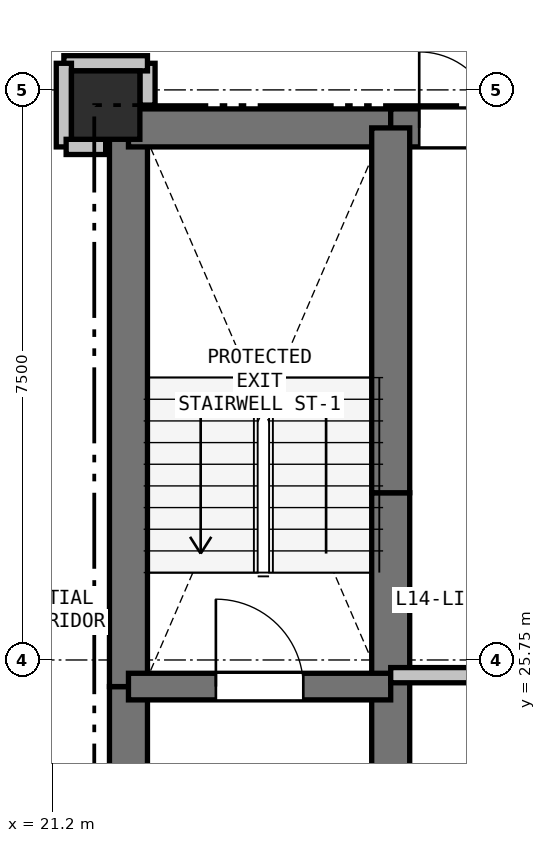
"""IFC4 building model, lengths in metres.
Left out: names, types, materials, properties, quantities, classifications, styles, units other than length and angle.
Written with IfcOpenShell. Run it as: python <this file> out.ifc"""

import sys

from ifc_helpers import new_model, si_unit, direction, frame, frame_2d, origin, origin_2d, place, context, subcontext, project, spatial, rectangle, extrude, element, fill, save


model = new_model("IFC4")
c1 = context("Model", 3, precision=1e-05, world=origin(), true_north=direction((0.0, 1.0)))
c2 = subcontext(c1, "Body", "Model", "MODEL_VIEW")
j1 = project(units=[si_unit("LENGTHUNIT", "METRE"), si_unit("PLANEANGLEUNIT", "RADIAN")], contexts=[c1])
p1 = place(None, origin())
s1 = spatial("IfcSite", under=j1, at=p1, CompositionType="ELEMENT")
p2 = place(p1, origin())
s2 = spatial("IfcBuilding", under=s1, at=p2, CompositionType="ELEMENT")
p3 = place(p2, frame((0.0, 0.0, 52.2)))
s3 = spatial("IfcBuildingStorey", under=s2, at=p3, CompositionType="ELEMENT", Elevation=52.2)
p4 = place(p3, frame((21.9, 33.05, 0.0), z_axis=(0.0, 0.0, 1.0), x_axis=(1.0, 0.0, 0.0)))
e1 = element("IfcColumn", 1, at=p4, inside=s3, PredefinedType="COLUMN", context=c2, shape_type="SweptSolid", body=[
    extrude(rectangle(XDim=0.9, YDim=0.9, at=origin_2d()), origin(), (0.0, 0.0, 1.0), 3.3),
])
p5 = place(p3, frame((22.2, 20.75, 0.0), z_axis=(0.0, 0.0, 1.0), x_axis=(0.0, 1.0, 0.0)))
e2 = element("IfcWall", 2, at=p5, inside=s3, PredefinedType="SHEAR", context=c2, shape_type="SweptSolid", body=[
    extrude(rectangle(XDim=4.65, YDim=0.5, at=frame_2d((2.325, 0.0))), origin(), (0.0, 0.0, 1.0), 3.04),
])
p6 = place(p3, frame((22.2, 25.4, 0.0), z_axis=(0.0, 0.0, 1.0), x_axis=(0.0, 1.0, 0.0)))
e3 = element("IfcWall", 3, at=p6, inside=s3, PredefinedType="SHEAR", context=c2, shape_type="SweptSolid", body=[
    extrude(rectangle(XDim=7.35, YDim=0.5, at=frame_2d((3.675, 0.0))), origin(), (0.0, 0.0, 1.0), 3.04),
])
p7 = place(p3, frame((22.2, 32.75, 0.0), z_axis=(0.0, 0.0, 1.0), x_axis=(1.0, 0.0, 0.0)))
e4 = element("IfcWall", 4, at=p7, inside=s3, PredefinedType="SHEAR", context=c2, shape_type="SweptSolid", body=[
    extrude(rectangle(XDim=3.45, YDim=0.5, at=frame_2d((1.725, 0.0))), origin(), (0.0, 0.0, 1.0), 3.04),
])
p8 = place(p3, frame((25.65, 32.75, 0.0), z_axis=(0.0, 0.0, 1.0), x_axis=(1.0, 0.0, 0.0)))
e5 = element("IfcWall", 5, at=p8, inside=s3, PredefinedType="SHEAR", context=c2, shape_type="SweptSolid", body=[
    extrude(rectangle(XDim=1.75, YDim=0.5, at=frame_2d((0.875, 0.0))), origin(), (0.0, 0.0, 1.0), 3.04),
])
p9 = place(p8, frame((0.375, 0.0, 0.0)))
e6 = element("IfcOpeningElement", 6, at=p9, cuts=e5, PredefinedType="OPENING", context=c2, shape_type="SweptSolid", body=[
    extrude(rectangle(XDim=1.0, YDim=2.15, at=frame_2d((0.5, 1.075))), frame((0.0, 0.26, 0.0), z_axis=(0.0, -1.0, 0.0), x_axis=(1.0, 0.0, 0.0)), (0.0, 0.0, 1.0), 0.52),
])
p10 = place(p3, frame((25.65, 22.75, 0.0), z_axis=(0.0, 0.0, 1.0), x_axis=(0.0, 1.0, 0.0)))
e7 = element("IfcWall", 7, at=p10, inside=s3, PredefinedType="SHEAR", context=c2, shape_type="SweptSolid", body=[
    extrude(rectangle(XDim=2.8, YDim=0.5, at=frame_2d((1.4, 0.0))), origin(), (0.0, 0.0, 1.0), 3.04),
])
p11 = place(p3, frame((25.65, 25.55, 0.0), z_axis=(0.0, 0.0, 1.0), x_axis=(0.0, 1.0, 0.0)))
e8 = element("IfcWall", 8, at=p11, inside=s3, PredefinedType="SHEAR", context=c2, shape_type="SweptSolid", body=[
    extrude(rectangle(XDim=2.4, YDim=0.5, at=frame_2d((1.2, 0.0))), origin(), (0.0, 0.0, 1.0), 3.04),
])
p12 = place(p3, frame((25.65, 27.95, 0.0), z_axis=(0.0, 0.0, 1.0), x_axis=(0.0, 1.0, 0.0)))
e9 = element("IfcWall", 9, at=p12, inside=s3, PredefinedType="SHEAR", context=c2, shape_type="SweptSolid", body=[
    extrude(rectangle(XDim=4.8, YDim=0.5, at=frame_2d((2.4, 0.0))), origin(), (0.0, 0.0, 1.0), 3.04),
])
p13 = place(p3, frame((22.2, 25.4, 0.0), z_axis=(0.0, 0.0, 1.0), x_axis=(1.0, 0.0, 0.0)))
e10 = element("IfcWall", 10, at=p13, inside=s3, PredefinedType="SHEAR", context=c2, shape_type="SweptSolid", body=[
    extrude(rectangle(XDim=3.45, YDim=0.35, at=frame_2d((1.725, 0.0))), origin(), (0.0, 0.0, 1.0), 3.04),
])
p14 = place(p13, frame((1.15, 0.0, 0.0)))
e11 = element("IfcOpeningElement", 11, at=p14, cuts=e10, PredefinedType="OPENING", context=c2, shape_type="SweptSolid", body=[
    extrude(rectangle(XDim=1.15, YDim=2.15, at=frame_2d((0.575, 1.075))), frame((0.0, 0.185, 0.0), z_axis=(0.0, -1.0, 0.0), x_axis=(1.0, 0.0, 0.0)), (0.0, 0.0, 1.0), 0.37),
])
p15 = place(p3, frame((25.65, 25.55, 0.0), z_axis=(0.0, 0.0, 1.0), x_axis=(1.0, 0.0, 0.0)))
e12 = element("IfcWall", 12, at=p15, inside=s3, PredefinedType="PARTITIONING", context=c2, shape_type="SweptSolid", body=[
    extrude(rectangle(XDim=4.95, YDim=0.2, at=frame_2d((2.475, 0.0))), origin(), (0.0, 0.0, 1.0), 3.04),
])
p16 = place(p3, frame((22.45, 33.05, 0.0), z_axis=(0.0, 0.0, 1.0), x_axis=(0.0, 1.0, 0.0)))
e13 = element("IfcWall", 13, at=p16, inside=s3, PredefinedType="PARTITIONING", context=c2, shape_type="SweptSolid", body=[
    extrude(rectangle(XDim=0.55, YDim=0.2, at=frame_2d((0.275, 0.0))), origin(), (0.0, 0.0, 1.0), 2.488),
])
p17 = place(p3, frame((22.45, 33.6, 0.0), z_axis=(0.0, 0.0, 1.0), x_axis=(-1.0, 0.0, 0.0)))
e14 = element("IfcWall", 14, at=p17, inside=s3, PredefinedType="PARTITIONING", context=c2, shape_type="SweptSolid", body=[
    extrude(rectangle(XDim=1.1, YDim=0.2, at=frame_2d((0.55, 0.0))), origin(), (0.0, 0.0, 1.0), 3.04),
])
p18 = place(p3, frame((21.35, 33.6, 0.0), z_axis=(0.0, 0.0, 1.0), x_axis=(0.0, -1.0, 0.0)))
e15 = element("IfcWall", 15, at=p18, inside=s3, PredefinedType="PARTITIONING", context=c2, shape_type="SweptSolid", body=[
    extrude(rectangle(XDim=1.1, YDim=0.2, at=frame_2d((0.55, 0.0))), origin(), (0.0, 0.0, 1.0), 2.338),
])
p19 = place(p3, frame((21.38, 32.5, 0.0), z_axis=(0.0, 0.0, 1.0), x_axis=(1.0, 0.0, 0.0)))
e16 = element("IfcWall", 16, at=p19, inside=s3, PredefinedType="PARTITIONING", context=c2, shape_type="SweptSolid", body=[
    extrude(rectangle(XDim=0.52, YDim=0.2, at=frame_2d((0.26, 0.0))), origin(), (0.0, 0.0, 1.0), 2.488),
])
p20 = place(p9, origin())
e17 = element("IfcDoor", 17, at=p20, inside=s3, OperationType="SINGLE_SWING_LEFT", PredefinedType="DOOR", context=c2, shape_type="SweptSolid", body=[
    extrude(rectangle(XDim=1.0, YDim=2.15, at=frame_2d((0.5, 1.075))), frame((0.0, 0.025, 0.0), z_axis=(0.0, -1.0, 0.0), x_axis=(1.0, 0.0, 0.0)), (0.0, 0.0, 1.0), 0.05),
])
fill(e6, e17)
p21 = place(p14, origin())
e18 = element("IfcDoor", 18, at=p21, inside=s3, OperationType="SINGLE_SWING_LEFT", PredefinedType="DOOR", context=c2, shape_type="SweptSolid", body=[
    extrude(rectangle(XDim=1.15, YDim=2.15, at=frame_2d((0.575, 1.075))), frame((0.0, 0.025, 0.0), z_axis=(0.0, -1.0, 0.0), x_axis=(1.0, 0.0, 0.0)), (0.0, 0.0, 1.0), 0.05),
])
fill(e11, e18)
save(model, sys.argv[1])
